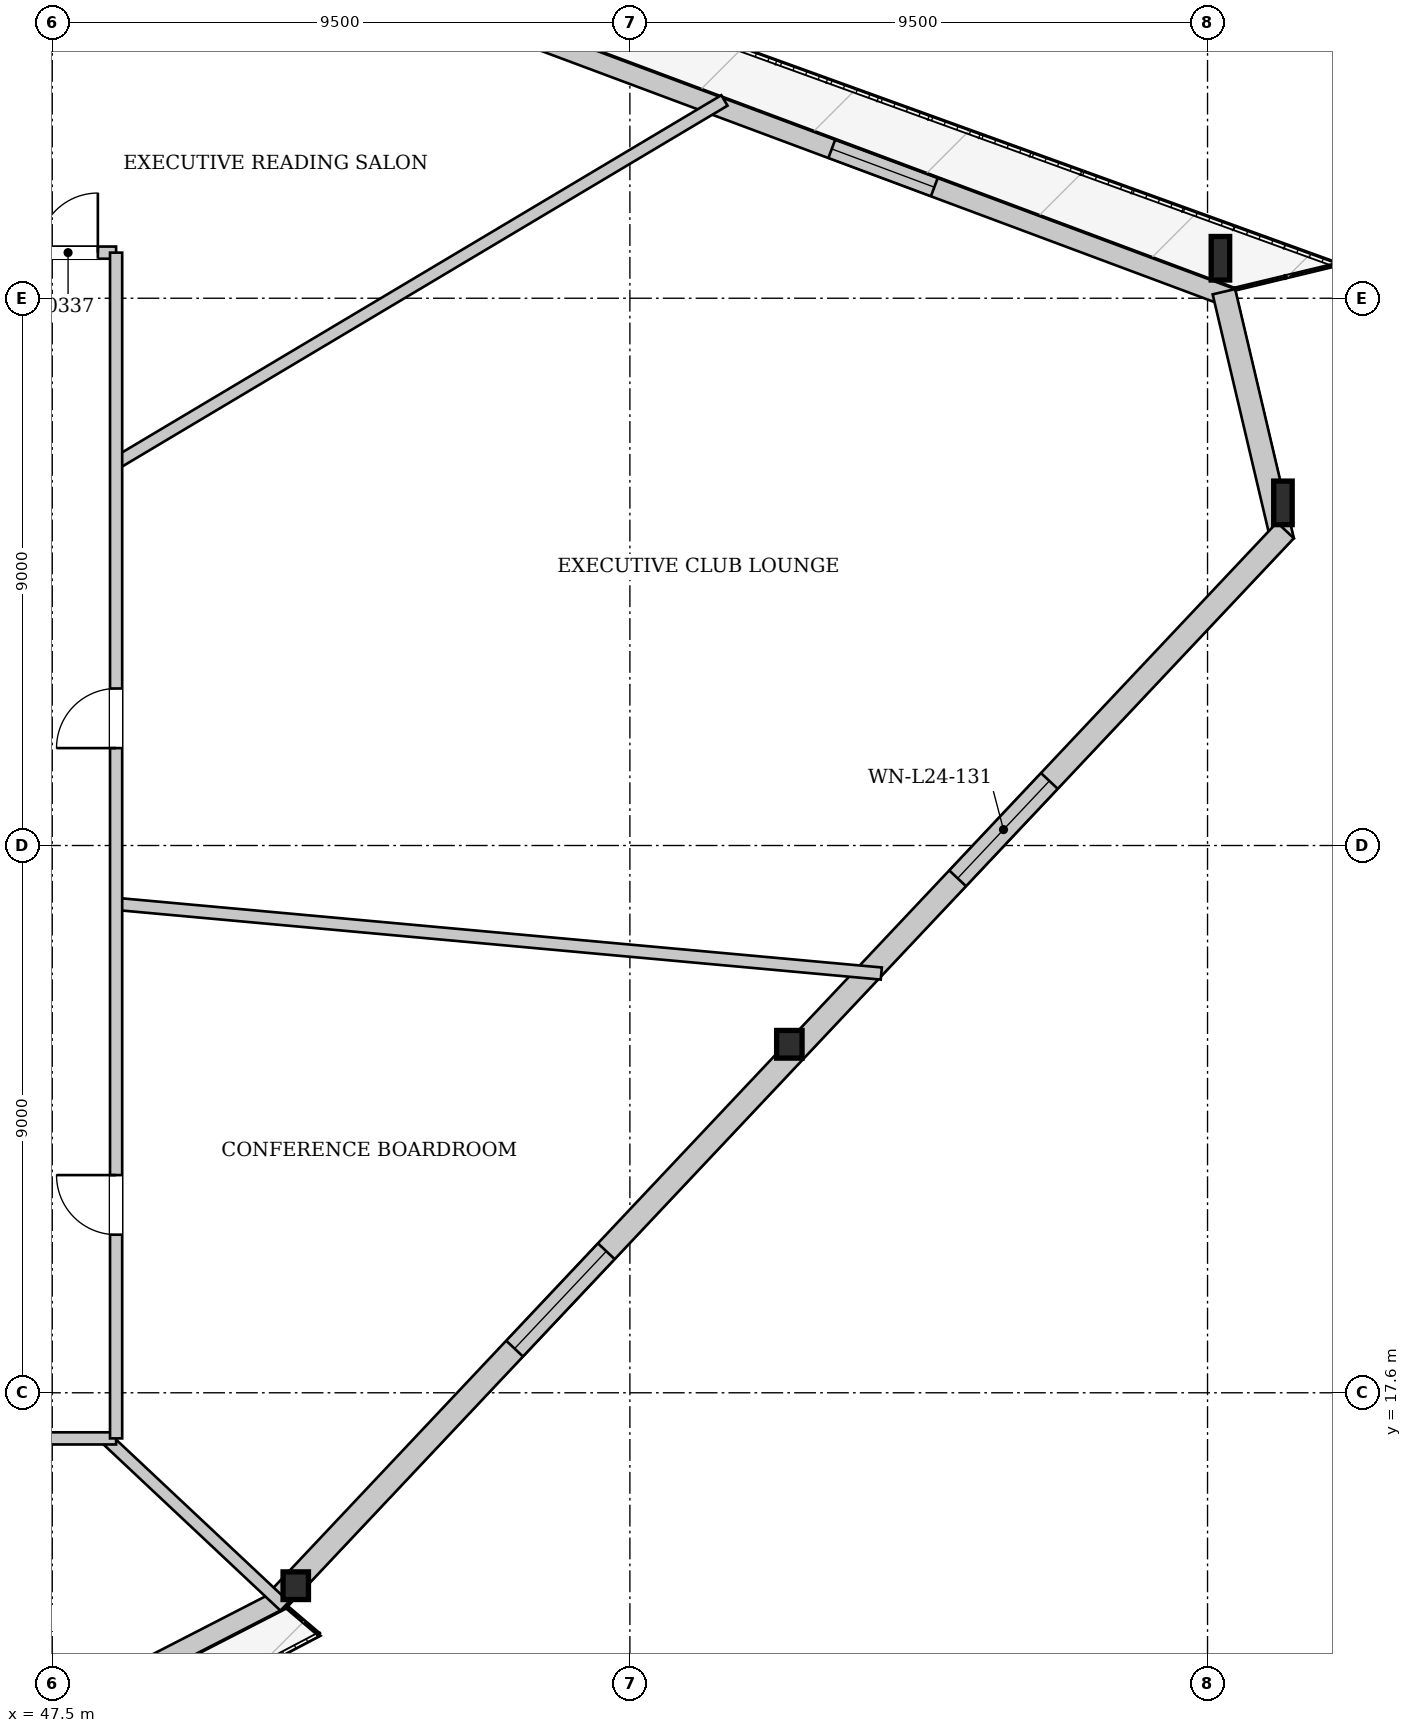
"""IFC4 building model, lengths in metres.
Left out: names, types, materials, properties, quantities, classifications, styles, units other than length and angle.
Written with IfcOpenShell. Run it as: python <this file> out.ifc"""

import sys

from ifc_helpers import new_model, si_unit, direction, frame, frame_2d, origin, origin_2d, place, context, subcontext, project, spatial, rectangle, i_section, extrude, source, transform, mapped, element, fill, save


model = new_model("IFC4")
c1 = context("Model", 3, precision=1e-05, world=origin(), true_north=direction((0.0, 1.0)))
c2 = subcontext(c1, "Body", "Model", "MODEL_VIEW")
j1 = project(units=[si_unit("LENGTHUNIT", "METRE"), si_unit("PLANEANGLEUNIT", "RADIAN")], contexts=[c1])
p1 = place(None, origin())
s1 = spatial("IfcSite", under=j1, at=p1, CompositionType="ELEMENT")
p2 = place(p1, origin())
s2 = spatial("IfcBuilding", under=s1, at=p2, CompositionType="ELEMENT")
p3 = place(p2, frame((0.0, 0.0, 95.05)))
s3 = spatial("IfcBuildingStorey", under=s2, at=p3, CompositionType="ELEMENT", Elevation=95.05)
m1 = source(origin(), c2, "Body", "SweptSolid", [
    extrude(i_section(OverallWidth=0.304, OverallDepth=0.716, WebThickness=0.021, FlangeThickness=0.04, at=origin_2d()), origin(), (0.0, 0.0, 1.0), 3.597),
])
p4 = place(p3, frame((67.919, 31.653, 0.0), z_axis=(-0.099696735978, 0.323454488545, 0.940977021332), x_axis=(-0.955635828254, -0.294550782985, 0.0)))
e1 = element("IfcColumn", 1, at=p4, inside=s3, PredefinedType="COLUMN", context=c2, shape_type="MappedRepresentation", body=[
    mapped(m1, transform((0.0, 0.0, 0.0), x_axis=(1.0, 0.0, 0.0), y_axis=(0.0, 1.0, 0.0), z_axis=(0.0, 0.0, 1.0), scale=1.0)),
])
m2 = source(origin(), c2, "Body", "SweptSolid", [
    extrude(i_section(OverallWidth=0.304, OverallDepth=0.716, WebThickness=0.021, FlangeThickness=0.04, at=origin_2d()), origin(), (0.0, 0.0, 1.0), 3.566),
])
p5 = place(p3, frame((66.954, 35.751, 0.0), z_axis=(-0.135884769408, 0.284023127593, 0.949139711757), x_axis=(-0.902075342607, -0.431578586424, 0.0)))
e2 = element("IfcColumn", 2, at=p5, inside=s3, PredefinedType="COLUMN", context=c2, shape_type="MappedRepresentation", body=[
    mapped(m2, transform((0.0, 0.0, 0.0), x_axis=(1.0, 0.0, 0.0), y_axis=(0.0, 1.0, 0.0), z_axis=(0.0, 0.0, 1.0), scale=1.0)),
])
m3 = source(origin(), c2, "Body", "SweptSolid", [
    extrude(i_section(OverallWidth=0.418, OverallDepth=0.455, WebThickness=0.038, FlangeThickness=0.059, at=origin_2d()), origin(), (0.0, 0.0, 1.0), 3.47),
])
p6 = place(p3, frame((51.359, 14.074, 0.0), z_axis=(0.083866504635, 0.203334059058, 0.975510978835), x_axis=(-0.924452695852, 0.381296752061, 0.0)))
e3 = element("IfcColumn", 3, at=p6, inside=s3, PredefinedType="COLUMN", context=c2, shape_type="MappedRepresentation", body=[
    mapped(m3, transform((0.0, 0.0, 0.0), x_axis=(1.0, 0.0, 0.0), y_axis=(0.0, 1.0, 0.0), z_axis=(0.0, 0.0, 1.0), scale=1.0)),
])
m4 = source(origin(), c2, "Body", "SweptSolid", [
    extrude(i_section(OverallWidth=0.418, OverallDepth=0.455, WebThickness=0.038, FlangeThickness=0.059, at=origin_2d()), origin(), (0.0, 0.0, 1.0), 3.512),
])
p7 = place(p3, frame((59.639, 22.864, 0.0), z_axis=(-0.009663242403, 0.266121524605, 0.963891049802), x_axis=(-0.999341392704, -0.036287474813, 0.0)))
e4 = element("IfcColumn", 4, at=p7, inside=s3, PredefinedType="COLUMN", context=c2, shape_type="MappedRepresentation", body=[
    mapped(m4, transform((0.0, 0.0, 0.0), x_axis=(1.0, 0.0, 0.0), y_axis=(0.0, 1.0, 0.0), z_axis=(0.0, 0.0, 1.0), scale=1.0)),
])
p8 = place(p3, frame((51.286, 14.217, 0.0), z_axis=(0.0, 0.0, 1.0), x_axis=(-0.889491175816, -0.456952347785, 0.0)))
e5 = element("IfcWall", 5, at=p8, inside=s3, PredefinedType="SOLIDWALL", context=c2, shape_type="SweptSolid", body=[
    extrude(rectangle(XDim=24.151, YDim=0.32, at=frame_2d((12.075, 0.0))), origin(), (0.0, 0.0, 1.0), 2.692),
])
p9 = place(p8, frame((7.178, 0.0, 0.0)))
e6 = element("IfcOpeningElement", 6, at=p9, cuts=e5, PredefinedType="OPENING", context=c2, shape_type="SweptSolid", body=[
    extrude(rectangle(XDim=1.1, YDim=2.3, at=frame_2d((0.55, 1.15))), frame((0.0, 0.17, 0.0), z_axis=(0.0, -1.0, 0.0), x_axis=(1.0, 0.0, 0.0)), (0.0, 0.0, 1.0), 0.34),
])
p10 = place(p8, frame((16.971, 0.0, 0.372)))
e7 = element("IfcOpeningElement", 7, at=p10, cuts=e5, PredefinedType="OPENING", context=c2, shape_type="SweptSolid", body=[
    extrude(rectangle(XDim=1.8, YDim=2.2, at=frame_2d((0.9, 1.1))), frame((0.0, 0.17, 0.0), z_axis=(0.0, -1.0, 0.0), x_axis=(1.0, 0.0, 0.0)), (0.0, 0.0, 1.0), 0.34),
])
p11 = place(p3, frame((44.84, 43.831, 0.0), z_axis=(0.0, 0.0, 1.0), x_axis=(0.936918509678, -0.349547859704, 0.0)))
e8 = element("IfcWall", 8, at=p11, inside=s3, PredefinedType="SOLIDWALL", context=c2, shape_type="SweptSolid", body=[
    extrude(rectangle(XDim=23.543, YDim=0.32, at=frame_2d((11.771, 0.0))), origin(), (0.0, 0.0, 1.0), 2.692),
])
p12 = place(p11, frame((6.984, 0.0, 0.0)))
e9 = element("IfcOpeningElement", 9, at=p12, cuts=e8, PredefinedType="OPENING", context=c2, shape_type="SweptSolid", body=[
    extrude(rectangle(XDim=1.1, YDim=2.3, at=frame_2d((0.55, 1.15))), frame((0.0, 0.17, 0.0), z_axis=(0.0, -1.0, 0.0), x_axis=(1.0, 0.0, 0.0)), (0.0, 0.0, 1.0), 0.34),
])
p13 = place(p11, frame((16.522, 0.0, 0.372)))
e10 = element("IfcOpeningElement", 10, at=p13, cuts=e8, PredefinedType="OPENING", context=c2, shape_type="SweptSolid", body=[
    extrude(rectangle(XDim=1.8, YDim=2.2, at=frame_2d((0.9, 1.1))), frame((0.0, 0.17, 0.0), z_axis=(0.0, -1.0, 0.0), x_axis=(1.0, 0.0, 0.0)), (0.0, 0.0, 1.0), 0.34),
])
p14 = place(p3, frame((66.77, 35.708, 0.0), z_axis=(0.0, 0.0, 1.0), x_axis=(0.229223557935, -0.973373803062, 0.0)))
e11 = element("IfcWall", 11, at=p14, inside=s3, PredefinedType="SOLIDWALL", context=c2, shape_type="SweptSolid", body=[
    extrude(rectangle(XDim=4.21, YDim=0.38, at=frame_2d((2.105, 0.0))), origin(), (0.0, 0.0, 1.0), 2.692),
])
p15 = place(p3, frame((67.781, 31.783, 0.0), z_axis=(0.0, 0.0, 1.0), x_axis=(-0.68571495336, -0.727870182614, 0.0)))
e12 = element("IfcWall", 12, at=p15, inside=s3, PredefinedType="SOLIDWALL", context=c2, shape_type="SweptSolid", body=[
    extrude(rectangle(XDim=24.15, YDim=0.38, at=frame_2d((12.075, 0.0))), origin(), (0.0, 0.0, 1.0), 2.692),
])
p16 = place(p15, frame((5.662, 0.0, 0.322)))
e13 = element("IfcOpeningElement", 13, at=p16, cuts=e12, PredefinedType="OPENING", context=c2, shape_type="SweptSolid", body=[
    extrude(rectangle(XDim=2.2, YDim=2.25, at=frame_2d((1.1, 1.125))), frame((0.0, 0.2, 0.0), z_axis=(0.0, -1.0, 0.0), x_axis=(1.0, 0.0, 0.0)), (0.0, 0.0, 1.0), 0.4),
])
p17 = place(p15, frame((16.288, 0.0, 0.322)))
e14 = element("IfcOpeningElement", 14, at=p17, cuts=e12, PredefinedType="OPENING", context=c2, shape_type="SweptSolid", body=[
    extrude(rectangle(XDim=2.2, YDim=2.25, at=frame_2d((1.1, 1.125))), frame((0.0, 0.2, 0.0), z_axis=(0.0, -1.0, 0.0), x_axis=(1.0, 0.0, 0.0)), (0.0, 0.0, 1.0), 0.4),
])
p18 = place(p3, frame((48.383, 16.85, 0.0), z_axis=(0.0, 0.0, 1.0), x_axis=(0.728946019142, -0.684571180505, 0.0)))
e15 = element("IfcWall", 15, at=p18, inside=s3, PredefinedType="PARTITIONING", context=c2, shape_type="SweptSolid", body=[
    extrude(rectangle(XDim=4.033, YDim=0.2, at=frame_2d((2.016, 0.0))), origin(), (0.0, 0.0, 1.0), 3.3),
])
p19 = place(p3, frame((48.55, 25.64, 0.0), z_axis=(0.0, 0.0, 1.0), x_axis=(0.995884491885, -0.090631555338, 0.0)))
e16 = element("IfcWall", 16, at=p19, inside=s3, PredefinedType="PARTITIONING", context=c2, shape_type="SweptSolid", body=[
    extrude(rectangle(XDim=12.636, YDim=0.2, at=frame_2d((6.318, 0.0))), origin(), (0.0, 0.0, 1.0), 3.3),
])
p20 = place(p3, frame((48.55, 32.889, 0.0), z_axis=(0.0, 0.0, 1.0), x_axis=(0.858967185963, 0.512030637208, 0.0)))
e17 = element("IfcWall", 17, at=p20, inside=s3, PredefinedType="PARTITIONING", context=c2, shape_type="SweptSolid", body=[
    extrude(rectangle(XDim=11.647, YDim=0.2, at=frame_2d((5.823, 0.0))), origin(), (0.0, 0.0, 1.0), 3.3),
])
p21 = place(p3, frame((27.45, 16.85, 0.0), z_axis=(0.0, 0.0, 1.0), x_axis=(1.0, 0.0, 0.0)))
e18 = element("IfcWall", 18, at=p21, inside=s3, PredefinedType="PARTITIONING", context=c2, shape_type="SweptSolid", body=[
    extrude(rectangle(XDim=21.1, YDim=0.2, at=frame_2d((10.55, 0.0))), origin(), (0.0, 0.0, 1.0), 3.3),
])
p22 = place(p21, frame((0.3, 0.0, 0.0)))
e19 = element("IfcOpeningElement", 19, at=p22, cuts=e18, PredefinedType="OPENING", context=c2, shape_type="SweptSolid", body=[
    extrude(rectangle(XDim=0.98, YDim=2.15, at=frame_2d((0.49, 1.075))), frame((0.0, 0.11, 0.0), z_axis=(0.0, -1.0, 0.0), x_axis=(1.0, 0.0, 0.0)), (0.0, 0.0, 1.0), 0.22),
])
p23 = place(p21, frame((8.16, 0.0, 0.0)))
e20 = element("IfcOpeningElement", 20, at=p23, cuts=e18, PredefinedType="OPENING", context=c2, shape_type="SweptSolid", body=[
    extrude(rectangle(XDim=0.98, YDim=2.15, at=frame_2d((0.49, 1.075))), frame((0.0, 0.11, 0.0), z_axis=(0.0, -1.0, 0.0), x_axis=(1.0, 0.0, 0.0)), (0.0, 0.0, 1.0), 0.22),
])
p24 = place(p21, frame((18.286, 0.0, 0.0)))
e21 = element("IfcOpeningElement", 21, at=p24, cuts=e18, PredefinedType="OPENING", context=c2, shape_type="SweptSolid", body=[
    extrude(rectangle(XDim=0.98, YDim=2.15, at=frame_2d((0.49, 1.075))), frame((0.0, 0.11, 0.0), z_axis=(0.0, -1.0, 0.0), x_axis=(1.0, 0.0, 0.0)), (0.0, 0.0, 1.0), 0.22),
])
p25 = place(p3, frame((27.45, 36.35, 0.0), z_axis=(0.0, 0.0, 1.0), x_axis=(1.0, 0.0, 0.0)))
e22 = element("IfcWall", 22, at=p25, inside=s3, PredefinedType="PARTITIONING", context=c2, shape_type="SweptSolid", body=[
    extrude(rectangle(XDim=21.1, YDim=0.2, at=frame_2d((10.55, 0.0))), origin(), (0.0, 0.0, 1.0), 3.3),
])
p26 = place(p25, frame((11.722, 0.0, 0.0)))
e23 = element("IfcOpeningElement", 23, at=p26, cuts=e22, PredefinedType="OPENING", context=c2, shape_type="SweptSolid", body=[
    extrude(rectangle(XDim=0.98, YDim=2.15, at=frame_2d((0.49, 1.075))), frame((0.0, 0.11, 0.0), z_axis=(0.0, -1.0, 0.0), x_axis=(1.0, 0.0, 0.0)), (0.0, 0.0, 1.0), 0.22),
])
p27 = place(p25, frame((1.25, 0.0, 0.0)))
e24 = element("IfcOpeningElement", 24, at=p27, cuts=e22, PredefinedType="OPENING", context=c2, shape_type="SweptSolid", body=[
    extrude(rectangle(XDim=0.98, YDim=2.15, at=frame_2d((0.49, 1.075))), frame((0.0, 0.11, 0.0), z_axis=(0.0, -1.0, 0.0), x_axis=(1.0, 0.0, 0.0)), (0.0, 0.0, 1.0), 0.22),
])
p28 = place(p25, frame((19.82, 0.0, 0.0)))
e25 = element("IfcOpeningElement", 25, at=p28, cuts=e22, PredefinedType="OPENING", context=c2, shape_type="SweptSolid", body=[
    extrude(rectangle(XDim=0.98, YDim=2.15, at=frame_2d((0.49, 1.075))), frame((0.0, 0.11, 0.0), z_axis=(0.0, -1.0, 0.0), x_axis=(1.0, 0.0, 0.0)), (0.0, 0.0, 1.0), 0.22),
])
p29 = place(p3, frame((48.55, 16.85, 0.0), z_axis=(0.0, 0.0, 1.0), x_axis=(0.0, 1.0, 0.0)))
e26 = element("IfcWall", 26, at=p29, inside=s3, PredefinedType="PARTITIONING", context=c2, shape_type="SweptSolid", body=[
    extrude(rectangle(XDim=19.5, YDim=0.2, at=frame_2d((9.75, 0.0))), origin(), (0.0, 0.0, 1.0), 3.3),
])
p30 = place(p29, frame((3.35, 0.0, 0.0)))
e27 = element("IfcOpeningElement", 27, at=p30, cuts=e26, PredefinedType="OPENING", context=c2, shape_type="SweptSolid", body=[
    extrude(rectangle(XDim=0.98, YDim=2.15, at=frame_2d((0.49, 1.075))), frame((0.0, 0.11, 0.0), z_axis=(0.0, -1.0, 0.0), x_axis=(1.0, 0.0, 0.0)), (0.0, 0.0, 1.0), 0.22),
])
p31 = place(p29, frame((11.352, 0.0, 0.0)))
e28 = element("IfcOpeningElement", 28, at=p31, cuts=e26, PredefinedType="OPENING", context=c2, shape_type="SweptSolid", body=[
    extrude(rectangle(XDim=0.98, YDim=2.15, at=frame_2d((0.49, 1.075))), frame((0.0, 0.11, 0.0), z_axis=(0.0, -1.0, 0.0), x_axis=(1.0, 0.0, 0.0)), (0.0, 0.0, 1.0), 0.22),
])
m5 = source(origin(), c2, "Body", "SweptSolid", [
    extrude(rectangle(XDim=1.8, YDim=2.2, at=frame_2d((0.9, 1.1))), frame((0.0, 0.03, 0.0), z_axis=(0.0, -1.0, 0.0), x_axis=(1.0, 0.0, 0.0)), (0.0, 0.0, 1.0), 0.06),
])
p32 = place(p13, origin())
e29 = element("IfcWindow", 29, at=p32, inside=s3, PartitioningType="SINGLE_PANEL", PredefinedType="WINDOW", context=c2, shape_type="MappedRepresentation", body=[
    mapped(m5, transform((0.0, 0.0, 0.0), x_axis=(1.0, 0.0, 0.0), y_axis=(0.0, 1.0, 0.0), z_axis=(0.0, 0.0, 1.0), scale=1.0)),
])
fill(e10, e29)
m6 = source(origin(), c2, "Body", "SweptSolid", [
    extrude(rectangle(XDim=2.2, YDim=2.25, at=frame_2d((1.1, 1.125))), frame((0.0, 0.03, 0.0), z_axis=(0.0, -1.0, 0.0), x_axis=(1.0, 0.0, 0.0)), (0.0, 0.0, 1.0), 0.06),
])
p33 = place(p16, origin())
e30 = element("IfcWindow", 30, at=p33, inside=s3, PartitioningType="SINGLE_PANEL", PredefinedType="WINDOW", context=c2, shape_type="MappedRepresentation", body=[
    mapped(m6, transform((0.0, 0.0, 0.0), x_axis=(1.0, 0.0, 0.0), y_axis=(0.0, 1.0, 0.0), z_axis=(0.0, 0.0, 1.0), scale=1.0)),
])
fill(e13, e30)
p34 = place(p17, origin())
e31 = element("IfcWindow", 31, at=p34, inside=s3, PartitioningType="SINGLE_PANEL", PredefinedType="WINDOW", context=c2, shape_type="MappedRepresentation", body=[
    mapped(m6, transform((0.0, 0.0, 0.0), x_axis=(1.0, 0.0, 0.0), y_axis=(0.0, 1.0, 0.0), z_axis=(0.0, 0.0, 1.0), scale=1.0)),
])
fill(e14, e31)
m7 = source(origin(), c2, "Body", "SweptSolid", [
    extrude(rectangle(XDim=0.98, YDim=2.15, at=frame_2d((0.49, 1.075))), frame((0.0, 0.025, 0.0), z_axis=(0.0, -1.0, 0.0), x_axis=(1.0, 0.0, 0.0)), (0.0, 0.0, 1.0), 0.05),
])
p35 = place(p28, origin())
e32 = element("IfcDoor", 32, at=p35, inside=s3, OperationType="SINGLE_SWING_RIGHT", PredefinedType="DOOR", context=c2, shape_type="MappedRepresentation", body=[
    mapped(m7, transform((0.0, 0.0, 0.0), x_axis=(1.0, 0.0, 0.0), y_axis=(0.0, 1.0, 0.0), z_axis=(0.0, 0.0, 1.0), scale=1.0)),
])
fill(e25, e32)
p36 = place(p30, origin())
e33 = element("IfcDoor", 33, at=p36, inside=s3, OperationType="SINGLE_SWING_RIGHT", PredefinedType="DOOR", context=c2, shape_type="MappedRepresentation", body=[
    mapped(m7, transform((0.0, 0.0, 0.0), x_axis=(1.0, 0.0, 0.0), y_axis=(0.0, 1.0, 0.0), z_axis=(0.0, 0.0, 1.0), scale=1.0)),
])
fill(e27, e33)
p37 = place(p31, origin())
e34 = element("IfcDoor", 34, at=p37, inside=s3, OperationType="SINGLE_SWING_LEFT", PredefinedType="DOOR", context=c2, shape_type="MappedRepresentation", body=[
    mapped(m7, transform((0.0, 0.0, 0.0), x_axis=(1.0, 0.0, 0.0), y_axis=(0.0, 1.0, 0.0), z_axis=(0.0, 0.0, 1.0), scale=1.0)),
])
fill(e28, e34)
save(model, sys.argv[1])
